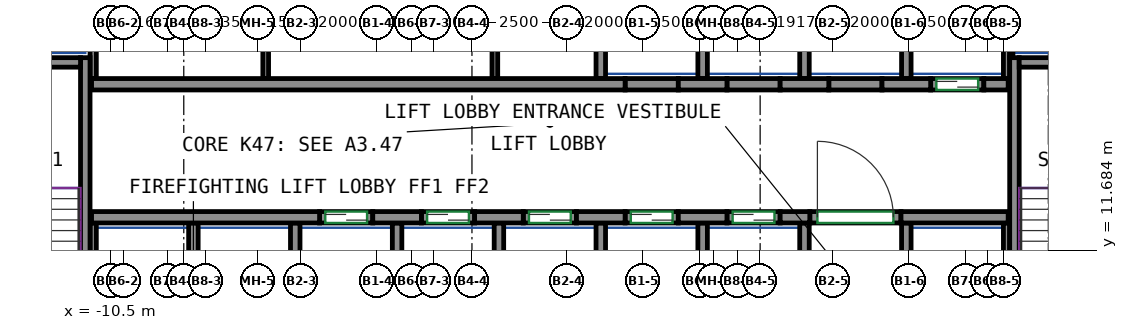
"""IFC4 building model, lengths in metres.
Left out: names, types, materials, properties, quantities, classifications, styles, units other than length and angle.
Written with IfcOpenShell. Run it as: python <this file> out.ifc"""

import sys

from ifc_helpers import new_model, si_unit, direction, frame, frame_2d, origin, place, context, subcontext, project, spatial, rectangle, extrude, source, transform, mapped, element, fill, save


model = new_model("IFC4")
c1 = context("Model", 3, precision=1e-05, world=origin(), true_north=direction((0.0, 1.0)))
c2 = subcontext(c1, "Body", "Model", "MODEL_VIEW")
j1 = project(units=[si_unit("LENGTHUNIT", "METRE"), si_unit("PLANEANGLEUNIT", "RADIAN")], contexts=[c1])
p1 = place(None, origin())
s1 = spatial("IfcSite", under=j1, at=p1, CompositionType="ELEMENT")
p2 = place(p1, origin())
s2 = spatial("IfcBuilding", under=s1, at=p2, CompositionType="ELEMENT")
p3 = place(p2, frame((0.0, 0.0, 192.3)))
s3 = spatial("IfcBuildingStorey", under=s2, at=p3, CompositionType="ELEMENT", Elevation=192.3)
m1 = source(origin(), c2, "Body", "SweptSolid", [
    extrude(rectangle(XDim=7.75, YDim=0.25, at=frame_2d((3.875, 0.0))), origin(), (0.0, 0.0, 1.0), 3.0),
])
p4 = place(p3, frame((-11.175, 9.0, 0.0), z_axis=(0.0, 0.0, 1.0), x_axis=(0.0, 1.0, 0.0)))
e1 = element("IfcWall", 1, at=p4, inside=s3, PredefinedType="SHEAR", context=c2, shape_type="MappedRepresentation", body=[
    mapped(m1, transform((0.0, 0.0, 0.0))),
])
m2 = source(origin(), c2, "Body", "SweptSolid", [
    extrude(rectangle(XDim=3.7, YDim=0.25, at=frame_2d((1.85, 0.0))), origin(), (0.0, 0.0, 1.0), 3.0),
])
p5 = place(p3, frame((-15.0, 16.625, 0.0), z_axis=(0.0, 0.0, 1.0), x_axis=(1.0, 0.0, 0.0)))
e2 = element("IfcWall", 2, at=p5, inside=s3, PredefinedType="SHEAR", context=c2, shape_type="MappedRepresentation", body=[
    mapped(m2, transform((0.0, 0.0, 0.0))),
])
p6 = place(p3, frame((13.275, 9.0, 0.0), z_axis=(0.0, 0.0, 1.0), x_axis=(0.0, 1.0, 0.0)))
e3 = element("IfcWall", 3, at=p6, inside=s3, PredefinedType="SHEAR", context=c2, shape_type="MappedRepresentation", body=[
    mapped(m1, transform((0.0, 0.0, 0.0))),
])
m3 = source(origin(), c2, "Body", "SweptSolid", [
    extrude(rectangle(XDim=3.7, YDim=0.25, at=frame_2d((1.85, 0.0))), origin(), (0.0, 0.0, 1.0), 3.0),
])
p7 = place(p3, frame((13.4, 16.625, 0.0), z_axis=(0.0, 0.0, 1.0), x_axis=(1.0, 0.0, 0.0)))
e4 = element("IfcWall", 4, at=p7, inside=s3, PredefinedType="SHEAR", context=c2, shape_type="MappedRepresentation", body=[
    mapped(m3, transform((0.0, 0.0, 0.0))),
])
m4 = source(origin(), c2, "Body", "SweptSolid", [
    extrude(rectangle(XDim=6.0, YDim=0.3, at=frame_2d((3.0, 0.0))), origin(), (0.0, 0.0, 1.0), 3.0),
])
p8 = place(p3, frame((-11.01, 12.55, 0.0), z_axis=(0.0, 0.0, 1.0), x_axis=(1.0, 0.0, 0.0)))
e5 = element("IfcWall", 5, at=p8, inside=s3, PredefinedType="SHEAR", context=c2, shape_type="MappedRepresentation", body=[
    mapped(m4, transform((0.0, 0.0, 0.0))),
])
m5 = source(origin(), c2, "Body", "SweptSolid", [
    extrude(rectangle(XDim=1.28, YDim=0.3, at=frame_2d((0.64, 0.0))), origin(), (0.0, 0.0, 1.0), 3.0),
])
for number, where, z_axis, x_axis in (
    (6, (-3.61, 12.55, 0.0), (0.0, 0.0, 1.0), (1.0, 0.0, 0.0)),
    (7, (-0.93, 12.55, 0.0), (0.0, 0.0, 1.0), (1.0, 0.0, 0.0)),
    (8, (1.75, 12.55, 0.0), (0.0, 0.0, 1.0), (1.0, 0.0, 0.0)),
    (9, (4.43, 12.55, 0.0), (0.0, 0.0, 1.0), (1.0, 0.0, 0.0)),
):
    element("IfcWall", number, at=place(p3, frame(where, z_axis=z_axis, x_axis=x_axis)), inside=s3, PredefinedType="SHEAR", context=c2, shape_type="MappedRepresentation", body=[
        mapped(m5, transform((0.0, 0.0, 0.0))),
    ])
m6 = source(origin(), c2, "Body", "SweptSolid", [
    extrude(rectangle(XDim=0.78, YDim=0.3, at=frame_2d((0.39, 0.0))), origin(), (0.0, 0.0, 1.0), 3.0),
])
p9 = place(p3, frame((7.11, 12.55, 0.0), z_axis=(0.0, 0.0, 1.0), x_axis=(1.0, 0.0, 0.0)))
e10 = element("IfcWall", 10, at=p9, inside=s3, PredefinedType="SHEAR", context=c2, shape_type="MappedRepresentation", body=[
    mapped(m6, transform((0.0, 0.0, 0.0))),
])
m7 = source(origin(), c2, "Body", "SweptSolid", [
    extrude(rectangle(XDim=2.82, YDim=0.3, at=frame_2d((1.41, 0.0))), origin(), (0.0, 0.0, 1.0), 3.0),
])
p10 = place(p3, frame((10.29, 12.55, 0.0), z_axis=(0.0, 0.0, 1.0), x_axis=(1.0, 0.0, 0.0)))
e11 = element("IfcWall", 11, at=p10, inside=s3, PredefinedType="SHEAR", context=c2, shape_type="MappedRepresentation", body=[
    mapped(m7, transform((0.0, 0.0, 0.0))),
])
m8 = source(origin(), c2, "Body", "SweptSolid", [
    extrude(rectangle(XDim=14.04, YDim=0.3, at=frame_2d((7.02, 0.0))), origin(), (0.0, 0.0, 1.0), 3.0),
])
p11 = place(p3, frame((-11.01, 16.05, 0.0), z_axis=(0.0, 0.0, 1.0), x_axis=(1.0, 0.0, 0.0)))
e12 = element("IfcWall", 12, at=p11, inside=s3, PredefinedType="SHEAR", context=c2, shape_type="MappedRepresentation", body=[
    mapped(m8, transform((0.0, 0.0, 0.0))),
])
p12 = place(p3, frame((4.43, 16.05, 0.0), z_axis=(0.0, 0.0, 1.0), x_axis=(1.0, 0.0, 0.0)))
e13 = element("IfcWall", 13, at=p12, inside=s3, PredefinedType="SHEAR", context=c2, shape_type="MappedRepresentation", body=[
    mapped(m5, transform((0.0, 0.0, 0.0))),
])
m9 = source(origin(), c2, "Body", "SweptSolid", [
    extrude(rectangle(XDim=1.28, YDim=0.3, at=frame_2d((0.64, 0.0))), origin(), (0.0, 0.0, 1.0), 3.0),
])
p13 = place(p3, frame((7.11, 16.05, 0.0), z_axis=(0.0, 0.0, 1.0), x_axis=(1.0, 0.0, 0.0)))
e14 = element("IfcWall", 14, at=p13, inside=s3, PredefinedType="SHEAR", context=c2, shape_type="MappedRepresentation", body=[
    mapped(m9, transform((0.0, 0.0, 0.0))),
])
p14 = place(p3, frame((9.79, 16.05, 0.0), z_axis=(0.0, 0.0, 1.0), x_axis=(1.0, 0.0, 0.0)))
e15 = element("IfcWall", 15, at=p14, inside=s3, PredefinedType="SHEAR", context=c2, shape_type="MappedRepresentation", body=[
    mapped(m5, transform((0.0, 0.0, 0.0))),
])
m10 = source(origin(), c2, "Body", "SweptSolid", [
    extrude(rectangle(XDim=0.64, YDim=0.3, at=frame_2d((0.32, 0.0))), origin(), (0.0, 0.0, 1.0), 3.0),
])
p15 = place(p3, frame((12.47, 16.05, 0.0), z_axis=(0.0, 0.0, 1.0), x_axis=(1.0, 0.0, 0.0)))
e16 = element("IfcWall", 16, at=p15, inside=s3, PredefinedType="SHEAR", context=c2, shape_type="MappedRepresentation", body=[
    mapped(m10, transform((0.0, 0.0, 0.0))),
])
m11 = source(origin(), c2, "Body", "SweptSolid", [
    extrude(rectangle(XDim=1.4, YDim=0.3, at=frame_2d((0.7, 0.0))), origin(), (0.0, 0.0, 1.0), 3.0),
])
p16 = place(p3, frame((-5.01, 12.55, 0.0), z_axis=(0.0, 0.0, 1.0), x_axis=(1.0, 0.0, 0.0)))
e17 = element("IfcWall", 17, at=p16, inside=s3, PredefinedType="PARTITIONING", context=c2, shape_type="MappedRepresentation", body=[
    mapped(m11, transform((0.0, 0.0, 0.0))),
])
p17 = place(p16, frame((0.15, 0.0, 0.0)))
e18 = element("IfcOpeningElement", 18, at=p17, cuts=e17, PredefinedType="OPENING", context=c2, shape_type="SweptSolid", body=[
    extrude(rectangle(XDim=1.1, YDim=2.1, at=frame_2d((0.55, 1.05))), frame((0.0, 0.16, 0.0), z_axis=(0.0, -1.0, 0.0), x_axis=(1.0, 0.0, 0.0)), (0.0, 0.0, 1.0), 0.32),
])
m12 = source(origin(), c2, "Body", "SweptSolid", [
    extrude(rectangle(XDim=1.4, YDim=0.3, at=frame_2d((0.7, 0.0))), origin(), (0.0, 0.0, 1.0), 3.0),
])
p18 = place(p3, frame((-2.33, 12.55, 0.0), z_axis=(0.0, 0.0, 1.0), x_axis=(1.0, 0.0, 0.0)))
e19 = element("IfcWall", 19, at=p18, inside=s3, PredefinedType="PARTITIONING", context=c2, shape_type="MappedRepresentation", body=[
    mapped(m12, transform((0.0, 0.0, 0.0))),
])
p19 = place(p18, frame((0.15, 0.0, 0.0)))
e20 = element("IfcOpeningElement", 20, at=p19, cuts=e19, PredefinedType="OPENING", context=c2, shape_type="SweptSolid", body=[
    extrude(rectangle(XDim=1.1, YDim=2.1, at=frame_2d((0.55, 1.05))), frame((0.0, 0.16, 0.0), z_axis=(0.0, -1.0, 0.0), x_axis=(1.0, 0.0, 0.0)), (0.0, 0.0, 1.0), 0.32),
])
p20 = place(p3, frame((0.35, 12.55, 0.0), z_axis=(0.0, 0.0, 1.0), x_axis=(1.0, 0.0, 0.0)))
e21 = element("IfcWall", 21, at=p20, inside=s3, PredefinedType="PARTITIONING", context=c2, shape_type="MappedRepresentation", body=[
    mapped(m11, transform((0.0, 0.0, 0.0))),
])
p21 = place(p20, frame((0.15, 0.0, 0.0)))
e22 = element("IfcOpeningElement", 22, at=p21, cuts=e21, PredefinedType="OPENING", context=c2, shape_type="SweptSolid", body=[
    extrude(rectangle(XDim=1.1, YDim=2.1, at=frame_2d((0.55, 1.05))), frame((0.0, 0.16, 0.0), z_axis=(0.0, -1.0, 0.0), x_axis=(1.0, 0.0, 0.0)), (0.0, 0.0, 1.0), 0.32),
])
p22 = place(p3, frame((3.03, 12.55, 0.0), z_axis=(0.0, 0.0, 1.0), x_axis=(1.0, 0.0, 0.0)))
e23 = element("IfcWall", 23, at=p22, inside=s3, PredefinedType="PARTITIONING", context=c2, shape_type="MappedRepresentation", body=[
    mapped(m11, transform((0.0, 0.0, 0.0))),
])
p23 = place(p22, frame((0.15, 0.0, 0.0)))
e24 = element("IfcOpeningElement", 24, at=p23, cuts=e23, PredefinedType="OPENING", context=c2, shape_type="SweptSolid", body=[
    extrude(rectangle(XDim=1.1, YDim=2.1, at=frame_2d((0.55, 1.05))), frame((0.0, 0.16, 0.0), z_axis=(0.0, -1.0, 0.0), x_axis=(1.0, 0.0, 0.0)), (0.0, 0.0, 1.0), 0.32),
])
p24 = place(p3, frame((5.71, 12.55, 0.0), z_axis=(0.0, 0.0, 1.0), x_axis=(1.0, 0.0, 0.0)))
e25 = element("IfcWall", 25, at=p24, inside=s3, PredefinedType="PARTITIONING", context=c2, shape_type="MappedRepresentation", body=[
    mapped(m12, transform((0.0, 0.0, 0.0))),
])
p25 = place(p24, frame((0.15, 0.0, 0.0)))
e26 = element("IfcOpeningElement", 26, at=p25, cuts=e25, PredefinedType="OPENING", context=c2, shape_type="SweptSolid", body=[
    extrude(rectangle(XDim=1.1, YDim=2.1, at=frame_2d((0.55, 1.05))), frame((0.0, 0.16, 0.0), z_axis=(0.0, -1.0, 0.0), x_axis=(1.0, 0.0, 0.0)), (0.0, 0.0, 1.0), 0.32),
])
p26 = place(p3, frame((11.07, 16.05, 0.0), z_axis=(0.0, 0.0, 1.0), x_axis=(1.0, 0.0, 0.0)))
e27 = element("IfcWall", 27, at=p26, inside=s3, PredefinedType="PARTITIONING", context=c2, shape_type="MappedRepresentation", body=[
    mapped(m11, transform((0.0, 0.0, 0.0))),
])
p27 = place(p26, frame((0.15, 0.0, 0.0)))
e28 = element("IfcOpeningElement", 28, at=p27, cuts=e27, PredefinedType="OPENING", context=c2, shape_type="SweptSolid", body=[
    extrude(rectangle(XDim=1.1, YDim=2.1, at=frame_2d((0.55, 1.05))), frame((0.0, 0.16, 0.0), z_axis=(0.0, -1.0, 0.0), x_axis=(1.0, 0.0, 0.0)), (0.0, 0.0, 1.0), 0.32),
])
m13 = source(origin(), c2, "Body", "SweptSolid", [
    extrude(rectangle(XDim=2.4, YDim=0.3, at=frame_2d((1.2, 0.0))), origin(), (0.0, 0.0, 1.0), 3.0),
])
p28 = place(p3, frame((7.89, 12.55, 0.0), z_axis=(0.0, 0.0, 1.0), x_axis=(1.0, 0.0, 0.0)))
e29 = element("IfcWall", 29, at=p28, inside=s3, PredefinedType="PARTITIONING", context=c2, shape_type="MappedRepresentation", body=[
    mapped(m13, transform((0.0, 0.0, 0.0))),
])
p29 = place(p28, frame((0.2, 0.0, 0.0)))
e30 = element("IfcOpeningElement", 30, at=p29, cuts=e29, PredefinedType="OPENING", context=c2, shape_type="SweptSolid", body=[
    extrude(rectangle(XDim=2.0, YDim=2.1, at=frame_2d((1.0, 1.05))), frame((0.0, 0.16, 0.0), z_axis=(0.0, -1.0, 0.0), x_axis=(1.0, 0.0, 0.0)), (0.0, 0.0, 1.0), 0.32),
])
p30 = place(p3, frame((3.03, 16.05, 0.0), z_axis=(0.0, 0.0, 1.0), x_axis=(1.0, 0.0, 0.0)))
e31 = element("IfcWall", 31, at=p30, inside=s3, PredefinedType="PARTITIONING", context=c2, shape_type="MappedRepresentation", body=[
    mapped(m11, transform((0.0, 0.0, 0.0))),
])
for number, where, z_axis, x_axis in (
    (32, (5.71, 16.05, 0.0), (0.0, 0.0, 1.0), (1.0, 0.0, 0.0)),
    (33, (8.39, 16.05, 0.0), (0.0, 0.0, 1.0), (1.0, 0.0, 0.0)),
):
    element("IfcWall", number, at=place(p3, frame(where, z_axis=z_axis, x_axis=x_axis)), inside=s3, PredefinedType="PARTITIONING", context=c2, shape_type="MappedRepresentation", body=[
        mapped(m12, transform((0.0, 0.0, 0.0))),
    ])
m14 = source(origin(), c2, "Body", "SweptSolid", [
    extrude(rectangle(XDim=3.275, YDim=0.165, at=frame_2d((1.638, 0.0))), origin(), (0.0, 0.0, 1.0), 3.0),
])
p31 = place(p3, frame((13.067, 16.2, 0.0), z_axis=(0.0, 0.0, 1.0), x_axis=(0.0, 1.0, 0.0)))
e34 = element("IfcWall", 34, at=p31, inside=s3, PredefinedType="PARTITIONING", context=c2, shape_type="MappedRepresentation", body=[
    mapped(m14, transform((0.0, 0.0, 0.0))),
])
m15 = source(origin(), c2, "Body", "SweptSolid", [
    extrude(rectangle(XDim=4.8, YDim=0.165, at=frame_2d((2.4, 0.0))), origin(), (0.0, 0.0, 1.0), 3.0),
])
p32 = place(p3, frame((-10.968, 16.2, 0.0), z_axis=(0.0, 0.0, 1.0), x_axis=(0.0, 1.0, 0.0)))
e35 = element("IfcWall", 35, at=p32, inside=s3, PredefinedType="PARTITIONING", context=c2, shape_type="MappedRepresentation", body=[
    mapped(m15, transform((0.0, 0.0, 0.0))),
])
m16 = source(origin(), c2, "Body", "SweptSolid", [
    extrude(rectangle(XDim=3.275, YDim=0.25, at=frame_2d((1.638, 0.0))), origin(), (0.0, 0.0, 1.0), 3.0),
])
p33 = place(p3, frame((10.43, 16.2, 0.0), z_axis=(0.0, 0.0, 1.0), x_axis=(0.0, 1.0, 0.0)))
e36 = element("IfcWall", 36, at=p33, inside=s3, PredefinedType="PARTITIONING", context=c2, shape_type="MappedRepresentation", body=[
    mapped(m16, transform((0.0, 0.0, 0.0))),
])
m17 = source(origin(), c2, "Body", "SweptSolid", [
    extrude(rectangle(XDim=2.725, YDim=0.085, at=frame_2d((1.363, 0.0))), origin(), (0.0, 0.0, 1.0), 3.0),
])
p34 = place(p3, frame((13.192, 16.75, 0.0), z_axis=(0.0, 0.0, 1.0), x_axis=(0.0, 1.0, 0.0)))
e37 = element("IfcWall", 37, at=p34, inside=s3, PredefinedType="PARTITIONING", context=c2, shape_type="MappedRepresentation", body=[
    mapped(m17, transform((0.0, 0.0, 0.0))),
])
for number, where, z_axis, x_axis in (
    (38, (2.39, 16.2, 0.0), (0.0, 0.0, 1.0), (0.0, 1.0, 0.0)),
    (39, (5.07, 16.2, 0.0), (0.0, 0.0, 1.0), (0.0, 1.0, 0.0)),
    (40, (7.75, 16.2, 0.0), (0.0, 0.0, 1.0), (0.0, 1.0, 0.0)),
):
    element("IfcWall", number, at=place(p3, frame(where, z_axis=z_axis, x_axis=x_axis)), inside=s3, PredefinedType="PARTITIONING", context=c2, shape_type="MappedRepresentation", body=[
        mapped(m16, transform((0.0, 0.0, 0.0))),
    ])
m18 = source(origin(), c2, "Body", "SweptSolid", [
    extrude(rectangle(XDim=3.4, YDim=0.25, at=frame_2d((1.7, 0.0))), origin(), (0.0, 0.0, 1.0), 3.0),
])
p35 = place(p3, frame((10.43, 9.0, 0.0), z_axis=(0.0, 0.0, 1.0), x_axis=(0.0, 1.0, 0.0)))
e41 = element("IfcWall", 41, at=p35, inside=s3, PredefinedType="PARTITIONING", context=c2, shape_type="MappedRepresentation", body=[
    mapped(m18, transform((0.0, 0.0, 0.0))),
])
m19 = source(origin(), c2, "Body", "SweptSolid", [
    extrude(rectangle(XDim=3.4, YDim=0.165, at=frame_2d((1.7, 0.0))), origin(), (0.0, 0.0, 1.0), 3.0),
])
p36 = place(p3, frame((13.067, 9.0, 0.0), z_axis=(0.0, 0.0, 1.0), x_axis=(0.0, 1.0, 0.0)))
e42 = element("IfcWall", 42, at=p36, inside=s3, PredefinedType="PARTITIONING", context=c2, shape_type="MappedRepresentation", body=[
    mapped(m19, transform((0.0, 0.0, 0.0))),
])
for number, where, z_axis, x_axis in (
    (43, (2.39, 9.0, 0.0), (0.0, 0.0, 1.0), (0.0, 1.0, 0.0)),
    (44, (5.07, 9.0, 0.0), (0.0, 0.0, 1.0), (0.0, 1.0, 0.0)),
    (45, (7.75, 9.0, 0.0), (0.0, 0.0, 1.0), (0.0, 1.0, 0.0)),
    (46, (-0.29, 9.0, 0.0), (0.0, 0.0, 1.0), (0.0, 1.0, 0.0)),
):
    element("IfcWall", number, at=place(p3, frame(where, z_axis=z_axis, x_axis=x_axis)), inside=s3, PredefinedType="PARTITIONING", context=c2, shape_type="MappedRepresentation", body=[
        mapped(m18, transform((0.0, 0.0, 0.0))),
    ])
p37 = place(p3, frame((-10.968, 9.0, 0.0), z_axis=(0.0, 0.0, 1.0), x_axis=(0.0, 1.0, 0.0)))
e47 = element("IfcWall", 47, at=p37, inside=s3, PredefinedType="PARTITIONING", context=c2, shape_type="MappedRepresentation", body=[
    mapped(m19, transform((0.0, 0.0, 0.0))),
])
for number, where, z_axis, x_axis in (
    (48, (-2.97, 9.0, 0.0), (0.0, 0.0, 1.0), (0.0, 1.0, 0.0)),
    (49, (-5.65, 9.0, 0.0), (0.0, 0.0, 1.0), (0.0, 1.0, 0.0)),
    (50, (-8.33, 9.0, 0.0), (0.0, 0.0, 1.0), (0.0, 1.0, 0.0)),
):
    element("IfcWall", number, at=place(p3, frame(where, z_axis=z_axis, x_axis=x_axis)), inside=s3, PredefinedType="PARTITIONING", context=c2, shape_type="MappedRepresentation", body=[
        mapped(m18, transform((0.0, 0.0, 0.0))),
    ])
m20 = source(origin(), c2, "Body", "SweptSolid", [
    extrude(rectangle(XDim=4.8, YDim=0.15, at=frame_2d((2.4, 0.0))), origin(), (0.0, 0.0, 1.0), 3.0),
])
for number, where, z_axis, x_axis in (
    (51, (-6.427, 16.2, 0.0), (0.0, 0.0, 1.0), (0.0, 1.0, 0.0)),
    (52, (-0.397, 16.2, 0.0), (0.0, 0.0, 1.0), (0.0, 1.0, 0.0)),
):
    element("IfcWall", number, at=place(p3, frame(where, z_axis=z_axis, x_axis=x_axis)), inside=s3, PredefinedType="PARTITIONING", context=c2, shape_type="MappedRepresentation", body=[
        mapped(m20, transform((0.0, 0.0, 0.0))),
    ])
p38 = place(p29, origin())
e53 = element("IfcDoor", 53, at=p38, inside=s3, OperationType="DOUBLE_DOOR_SINGLE_SWING", PredefinedType="DOOR", context=c2, shape_type="SweptSolid", body=[
    extrude(rectangle(XDim=2.0, YDim=2.1, at=frame_2d((1.0, 1.05))), frame((0.0, 0.025, 0.0), z_axis=(0.0, -1.0, 0.0), x_axis=(1.0, 0.0, 0.0)), (0.0, 0.0, 1.0), 0.05),
])
fill(e30, e53)
p39 = place(p17, origin())
e54 = element("IfcDoor", 54, at=p39, inside=s3, OperationType="DOUBLE_DOOR_SLIDING", PredefinedType="DOOR", context=c2, shape_type="SweptSolid", body=[
    extrude(rectangle(XDim=1.1, YDim=2.1, at=frame_2d((0.55, 1.05))), frame((0.0, 0.025, 0.0), z_axis=(0.0, -1.0, 0.0), x_axis=(1.0, 0.0, 0.0)), (0.0, 0.0, 1.0), 0.05),
])
fill(e18, e54)
p40 = place(p19, origin())
e55 = element("IfcDoor", 55, at=p40, inside=s3, OperationType="DOUBLE_DOOR_SLIDING", PredefinedType="DOOR", context=c2, shape_type="SweptSolid", body=[
    extrude(rectangle(XDim=1.1, YDim=2.1, at=frame_2d((0.55, 1.05))), frame((0.0, 0.025, 0.0), z_axis=(0.0, -1.0, 0.0), x_axis=(1.0, 0.0, 0.0)), (0.0, 0.0, 1.0), 0.05),
])
fill(e20, e55)
p41 = place(p21, origin())
e56 = element("IfcDoor", 56, at=p41, inside=s3, OperationType="DOUBLE_DOOR_SLIDING", PredefinedType="DOOR", context=c2, shape_type="SweptSolid", body=[
    extrude(rectangle(XDim=1.1, YDim=2.1, at=frame_2d((0.55, 1.05))), frame((0.0, 0.025, 0.0), z_axis=(0.0, -1.0, 0.0), x_axis=(1.0, 0.0, 0.0)), (0.0, 0.0, 1.0), 0.05),
])
fill(e22, e56)
p42 = place(p23, origin())
e57 = element("IfcDoor", 57, at=p42, inside=s3, OperationType="DOUBLE_DOOR_SLIDING", PredefinedType="DOOR", context=c2, shape_type="SweptSolid", body=[
    extrude(rectangle(XDim=1.1, YDim=2.1, at=frame_2d((0.55, 1.05))), frame((0.0, 0.025, 0.0), z_axis=(0.0, -1.0, 0.0), x_axis=(1.0, 0.0, 0.0)), (0.0, 0.0, 1.0), 0.05),
])
fill(e24, e57)
p43 = place(p25, origin())
e58 = element("IfcDoor", 58, at=p43, inside=s3, OperationType="DOUBLE_DOOR_SLIDING", PredefinedType="DOOR", context=c2, shape_type="SweptSolid", body=[
    extrude(rectangle(XDim=1.1, YDim=2.1, at=frame_2d((0.55, 1.05))), frame((0.0, 0.025, 0.0), z_axis=(0.0, -1.0, 0.0), x_axis=(1.0, 0.0, 0.0)), (0.0, 0.0, 1.0), 0.05),
])
fill(e26, e58)
p44 = place(p27, origin())
e59 = element("IfcDoor", 59, at=p44, inside=s3, OperationType="DOUBLE_DOOR_SLIDING", PredefinedType="DOOR", context=c2, shape_type="SweptSolid", body=[
    extrude(rectangle(XDim=1.1, YDim=2.1, at=frame_2d((0.55, 1.05))), frame((0.0, 0.025, 0.0), z_axis=(0.0, -1.0, 0.0), x_axis=(1.0, 0.0, 0.0)), (0.0, 0.0, 1.0), 0.05),
])
fill(e28, e59)
save(model, sys.argv[1])
